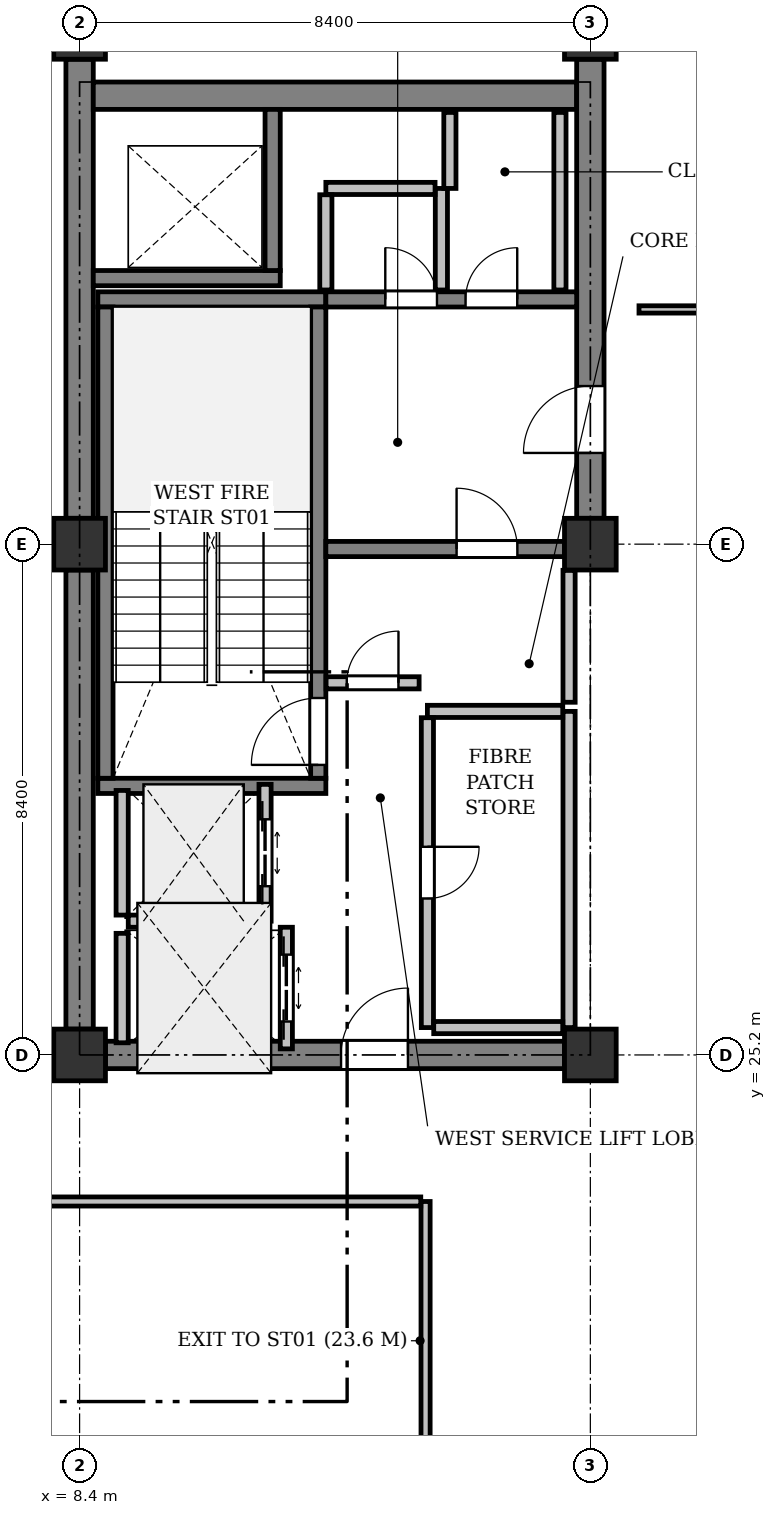
"""IFC4 building model, lengths in metres.
Left out: names, types, materials, properties, quantities, classifications, styles, units other than length and angle.
Written with IfcOpenShell. Run it as: python <this file> out.ifc"""

import sys

from ifc_helpers import new_model, si_unit, direction, frame, frame_2d, origin, origin_2d, place, context, subcontext, project, spatial, rectangle, extrude, element, fill, save


model = new_model("IFC4")
c1 = context("Model", 3, precision=1e-05, world=origin(), true_north=direction((0.0, 1.0)))
c2 = subcontext(c1, "Body", "Model", "MODEL_VIEW")
j1 = project(units=[si_unit("LENGTHUNIT", "METRE"), si_unit("PLANEANGLEUNIT", "RADIAN")], contexts=[c1])
p1 = place(None, origin())
s1 = spatial("IfcSite", under=j1, at=p1, CompositionType="ELEMENT")
p2 = place(p1, origin())
s2 = spatial("IfcBuilding", under=s1, at=p2, CompositionType="ELEMENT")
p3 = place(p2, frame((0.0, 0.0, 245.2)))
s3 = spatial("IfcBuildingStorey", under=s2, at=p3, CompositionType="ELEMENT", Elevation=245.2)
for number, where, z_axis, x_axis in (
    (1, (8.4, 25.2, 0.0), (0.0, 0.0, 1.0), (1.0, 0.0, 0.0)),
    (2, (8.4, 33.6, 0.0), (0.0, 0.0, 1.0), (1.0, 0.0, 0.0)),
    (3, (8.4, 42.0, 0.0), (0.0, 0.0, 1.0), (1.0, 0.0, 0.0)),
    (4, (16.8, 25.2, 0.0), (0.0, 0.0, 1.0), (1.0, 0.0, 0.0)),
    (5, (16.8, 33.6, 0.0), (0.0, 0.0, 1.0), (1.0, 0.0, 0.0)),
    (6, (16.8, 42.0, 0.0), (0.0, 0.0, 1.0), (1.0, 0.0, 0.0)),
):
    element("IfcColumn", number, at=place(p3, frame(where, z_axis=z_axis, x_axis=x_axis)), inside=s3, PredefinedType="COLUMN", context=c2, shape_type="SweptSolid", body=[
        extrude(rectangle(XDim=1.0, YDim=1.0, at=origin_2d()), origin(), (0.0, 0.0, 1.0), 5.0),
    ])
p4 = place(p3, frame((8.4, 25.7, 0.0), z_axis=(0.0, 0.0, 1.0), x_axis=(0.0, 1.0, 0.0)))
e7 = element("IfcWall", 7, at=p4, inside=s3, PredefinedType="SHEAR", context=c2, shape_type="SweptSolid", body=[
    extrude(rectangle(XDim=7.4, YDim=0.45, at=frame_2d((3.7, 0.0))), origin(), (0.0, 0.0, 1.0), 4.725),
])
p5 = place(p3, frame((8.4, 34.1, 0.0), z_axis=(0.0, 0.0, 1.0), x_axis=(0.0, 1.0, 0.0)))
e8 = element("IfcWall", 8, at=p5, inside=s3, PredefinedType="SHEAR", context=c2, shape_type="SweptSolid", body=[
    extrude(rectangle(XDim=7.4, YDim=0.45, at=frame_2d((3.7, 0.0))), origin(), (0.0, 0.0, 1.0), 4.725),
])
p6 = place(p3, frame((8.625, 40.975, 0.0), z_axis=(0.0, 0.0, 1.0), x_axis=(1.0, 0.0, 0.0)))
e9 = element("IfcWall", 9, at=p6, inside=s3, PredefinedType="SHEAR", context=c2, shape_type="SweptSolid", body=[
    extrude(rectangle(XDim=7.95, YDim=0.45, at=frame_2d((3.975, 0.0))), origin(), (0.0, 0.0, 1.0), 4.725),
])
p7 = place(p3, frame((16.8, 34.1, 0.0), z_axis=(0.0, 0.0, 1.0), x_axis=(0.0, 1.0, 0.0)))
e10 = element("IfcWall", 10, at=p7, inside=s3, PredefinedType="SHEAR", context=c2, shape_type="SweptSolid", body=[
    extrude(rectangle(XDim=7.4, YDim=0.45, at=frame_2d((3.7, 0.0))), origin(), (0.0, 0.0, 1.0), 4.725),
])
p8 = place(p7, frame((1.0, 0.0, 0.0)))
e11 = element("IfcOpeningElement", 11, at=p8, cuts=e10, PredefinedType="OPENING", context=c2, shape_type="SweptSolid", body=[
    extrude(rectangle(XDim=1.1, YDim=2.15, at=frame_2d((0.55, 1.075))), frame((0.0, 0.235, 0.0), z_axis=(0.0, -1.0, 0.0), x_axis=(1.0, 0.0, 0.0)), (0.0, 0.0, 1.0), 0.47),
])
p9 = place(p3, frame((8.9, 25.2, 0.0), z_axis=(0.0, 0.0, 1.0), x_axis=(1.0, 0.0, 0.0)))
e12 = element("IfcWall", 12, at=p9, inside=s3, PredefinedType="SHEAR", context=c2, shape_type="SweptSolid", body=[
    extrude(rectangle(XDim=7.4, YDim=0.45, at=frame_2d((3.7, 0.0))), origin(), (0.0, 0.0, 1.0), 4.725),
])
p10 = place(p9, frame((3.8, 0.0, 0.0)))
e13 = element("IfcOpeningElement", 13, at=p10, cuts=e12, PredefinedType="OPENING", context=c2, shape_type="SweptSolid", body=[
    extrude(rectangle(XDim=1.1, YDim=2.15, at=frame_2d((0.55, 1.075))), frame((0.0, 0.235, 0.0), z_axis=(0.0, -1.0, 0.0), x_axis=(1.0, 0.0, 0.0)), (0.0, 0.0, 1.0), 0.47),
])
for number, where, z_axis, x_axis in (
    (14, (12.45, 29.625, 0.0), (0.0, 0.0, 1.0), (-1.0, 0.0, 0.0)),
    (15, (12.45, 37.625, 0.0), (0.0, 0.0, 1.0), (-1.0, 0.0, 0.0)),
):
    element("IfcWall", number, at=place(p3, frame(where, z_axis=z_axis, x_axis=x_axis)), inside=s3, PredefinedType="SHEAR", context=c2, shape_type="SweptSolid", body=[
        extrude(rectangle(XDim=3.75, YDim=0.25, at=frame_2d((1.875, 0.0))), origin(), (0.0, 0.0, 1.0), 4.725),
    ])
p11 = place(p3, frame((12.325, 29.75, 0.0), z_axis=(0.0, 0.0, 1.0), x_axis=(0.0, 1.0, 0.0)))
e16 = element("IfcWall", 16, at=p11, inside=s3, PredefinedType="SHEAR", context=c2, shape_type="SweptSolid", body=[
    extrude(rectangle(XDim=7.75, YDim=0.25, at=frame_2d((3.875, 0.0))), origin(), (0.0, 0.0, 1.0), 4.725),
])
p12 = place(p11, frame((0.22, 0.0, 0.0)))
e17 = element("IfcOpeningElement", 17, at=p12, cuts=e16, PredefinedType="OPENING", context=c2, shape_type="SweptSolid", body=[
    extrude(rectangle(XDim=1.1, YDim=2.15, at=frame_2d((0.55, 1.075))), frame((0.0, 0.135, 0.0), z_axis=(0.0, -1.0, 0.0), x_axis=(1.0, 0.0, 0.0)), (0.0, 0.0, 1.0), 0.27),
])
p13 = place(p3, frame((8.825, 29.75, 0.0), z_axis=(0.0, 0.0, 1.0), x_axis=(0.0, 1.0, 0.0)))
e18 = element("IfcWall", 18, at=p13, inside=s3, PredefinedType="SHEAR", context=c2, shape_type="SweptSolid", body=[
    extrude(rectangle(XDim=7.75, YDim=0.25, at=frame_2d((3.875, 0.0))), origin(), (0.0, 0.0, 1.0), 4.725),
])
p14 = place(p3, frame((8.625, 37.975, 0.0), z_axis=(0.0, 0.0, 1.0), x_axis=(1.0, 0.0, 0.0)))
e19 = element("IfcWall", 19, at=p14, inside=s3, PredefinedType="SHEAR", context=c2, shape_type="SweptSolid", body=[
    extrude(rectangle(XDim=3.075, YDim=0.25, at=frame_2d((1.538, 0.0))), origin(), (0.0, 0.0, 1.0), 4.725),
])
p15 = place(p3, frame((11.575, 38.1, 0.0), z_axis=(0.0, 0.0, 1.0), x_axis=(0.0, 1.0, 0.0)))
e20 = element("IfcWall", 20, at=p15, inside=s3, PredefinedType="SHEAR", context=c2, shape_type="SweptSolid", body=[
    extrude(rectangle(XDim=2.65, YDim=0.25, at=frame_2d((1.325, 0.0))), origin(), (0.0, 0.0, 1.0), 4.725),
])
p16 = place(p3, frame((12.45, 33.52, 0.0), z_axis=(0.0, 0.0, 1.0), x_axis=(1.0, 0.0, 0.0)))
e21 = element("IfcWall", 21, at=p16, inside=s3, PredefinedType="SHEAR", context=c2, shape_type="SweptSolid", body=[
    extrude(rectangle(XDim=3.85, YDim=0.25, at=frame_2d((1.925, 0.0))), origin(), (0.0, 0.0, 1.0), 4.725),
])
p17 = place(p16, frame((0.32, 0.0, 0.0)))
e22 = element("IfcOpeningElement", 22, at=p17, cuts=e21, PredefinedType="OPENING", context=c2, shape_type="SweptSolid", body=[
    extrude(rectangle(XDim=1.0, YDim=2.15, at=frame_2d((0.5, 1.075))), frame((0.0, 0.135, 0.0), z_axis=(0.0, -1.0, 0.0), x_axis=(1.0, 0.0, 0.0)), (0.0, 0.0, 1.0), 0.27),
])
p18 = place(p3, frame((12.45, 37.625, 0.0), z_axis=(0.0, 0.0, 1.0), x_axis=(1.0, 0.0, 0.0)))
e23 = element("IfcWall", 23, at=p18, inside=s3, PredefinedType="SHEAR", context=c2, shape_type="SweptSolid", body=[
    extrude(rectangle(XDim=4.125, YDim=0.25, at=frame_2d((2.062, 0.0))), origin(), (0.0, 0.0, 1.0), 4.725),
])
p19 = place(p18, frame((1.637, 0.0, 0.0)))
e24 = element("IfcOpeningElement", 24, at=p19, cuts=e23, PredefinedType="OPENING", context=c2, shape_type="SweptSolid", body=[
    extrude(rectangle(XDim=0.85, YDim=2.15, at=frame_2d((0.425, 1.075))), frame((0.0, 0.135, 0.0), z_axis=(0.0, -1.0, 0.0), x_axis=(1.0, 0.0, 0.0)), (0.0, 0.0, 1.0), 0.27),
])
p20 = place(p3, frame((11.45, 27.4, 0.0), z_axis=(0.0, 0.0, 1.0), x_axis=(0.0, 1.0, 0.0)))
e25 = element("IfcWall", 25, at=p20, inside=s3, PredefinedType="PARTITIONING", context=c2, shape_type="SweptSolid", body=[
    extrude(rectangle(XDim=2.25, YDim=0.2, at=frame_2d((1.125, 0.0))), origin(), (0.0, 0.0, 1.0), 4.725),
])
p21 = place(p20, frame((0.575, 0.0, 0.0)))
e26 = element("IfcOpeningElement", 26, at=p21, cuts=e25, PredefinedType="OPENING", context=c2, shape_type="SweptSolid", body=[
    extrude(rectangle(XDim=1.1, YDim=2.2, at=frame_2d((0.55, 1.1))), frame((0.0, 0.11, 0.0), z_axis=(0.0, -1.0, 0.0), x_axis=(1.0, 0.0, 0.0)), (0.0, 0.0, 1.0), 0.22),
])
p22 = place(p3, frame((9.1, 27.5, 0.0), z_axis=(0.0, 0.0, 1.0), x_axis=(0.0, 1.0, 0.0)))
e27 = element("IfcWall", 27, at=p22, inside=s3, PredefinedType="PARTITIONING", context=c2, shape_type="SweptSolid", body=[
    extrude(rectangle(XDim=2.05, YDim=0.2, at=frame_2d((1.025, 0.0))), origin(), (0.0, 0.0, 1.0), 4.725),
])
p23 = place(p3, frame((9.2, 27.4, 0.0), z_axis=(0.0, 0.0, 1.0), x_axis=(1.0, 0.0, 0.0)))
e28 = element("IfcWall", 28, at=p23, inside=s3, PredefinedType="PARTITIONING", context=c2, shape_type="SweptSolid", body=[
    extrude(rectangle(XDim=2.15, YDim=0.2, at=frame_2d((1.075, 0.0))), origin(), (0.0, 0.0, 1.0), 4.725),
])
p24 = place(p3, frame((11.8, 25.3, 0.0), z_axis=(0.0, 0.0, 1.0), x_axis=(0.0, 1.0, 0.0)))
e29 = element("IfcWall", 29, at=p24, inside=s3, PredefinedType="PARTITIONING", context=c2, shape_type="SweptSolid", body=[
    extrude(rectangle(XDim=2.0, YDim=0.2, at=frame_2d((1.0, 0.0))), origin(), (0.0, 0.0, 1.0), 4.725),
])
p25 = place(p24, frame((0.45, 0.0, 0.0)))
e30 = element("IfcOpeningElement", 30, at=p25, cuts=e29, PredefinedType="OPENING", context=c2, shape_type="SweptSolid", body=[
    extrude(rectangle(XDim=1.1, YDim=2.2, at=frame_2d((0.55, 1.1))), frame((0.0, 0.11, 0.0), z_axis=(0.0, -1.0, 0.0), x_axis=(1.0, 0.0, 0.0)), (0.0, 0.0, 1.0), 0.22),
])
p26 = place(p3, frame((9.1, 25.4, 0.0), z_axis=(0.0, 0.0, 1.0), x_axis=(0.0, 1.0, 0.0)))
e31 = element("IfcWall", 31, at=p26, inside=s3, PredefinedType="PARTITIONING", context=c2, shape_type="SweptSolid", body=[
    extrude(rectangle(XDim=1.8, YDim=0.2, at=frame_2d((0.9, 0.0))), origin(), (0.0, 0.0, 1.0), 4.725),
])
p27 = place(p3, frame((16.45, 25.705, 0.0), z_axis=(0.0, 0.0, 1.0), x_axis=(0.0, 1.0, 0.0)))
e32 = element("IfcWall", 32, at=p27, inside=s3, PredefinedType="PARTITIONING", context=c2, shape_type="SweptSolid", body=[
    extrude(rectangle(XDim=7.39, YDim=0.2, at=frame_2d((3.695, 0.0))), origin(), (0.0, 0.0, 1.0), 4.725),
])
p28 = place(p3, frame((14.25, 33.39, 0.0), z_axis=(0.0, 0.0, 1.0), x_axis=(0.0, -1.0, 0.0)))
e33 = element("IfcWall", 33, at=p28, inside=s3, PredefinedType="PARTITIONING", context=c2, shape_type="SweptSolid", body=[
    extrude(rectangle(XDim=7.74, YDim=0.2, at=frame_2d((3.87, 0.0))), origin(), (0.0, 0.0, 1.0), 4.725),
])
p29 = place(p28, frame((3.445, 0.0, 0.0)))
e34 = element("IfcOpeningElement", 34, at=p29, cuts=e33, PredefinedType="OPENING", context=c2, shape_type="SweptSolid", body=[
    extrude(rectangle(XDim=0.85, YDim=2.15, at=frame_2d((0.425, 1.075))), frame((0.0, 0.11, 0.0), z_axis=(0.0, -1.0, 0.0), x_axis=(1.0, 0.0, 0.0)), (0.0, 0.0, 1.0), 0.22),
])
p30 = place(p3, frame((14.354, 25.65, 0.0), z_axis=(0.0, 0.0, 1.0), x_axis=(1.0, 0.0, 0.0)))
e35 = element("IfcWall", 35, at=p30, inside=s3, PredefinedType="PARTITIONING", context=c2, shape_type="SweptSolid", body=[
    extrude(rectangle(XDim=1.941, YDim=0.2, at=frame_2d((0.97, 0.0))), origin(), (0.0, 0.0, 1.0), 4.725),
])
for number, where, z_axis, x_axis in (
    (36, (16.3, 37.78, 0.0), (0.0, 0.0, 1.0), (0.0, 1.0, 0.0)),
    (37, (12.45, 40.7, 0.0), (0.0, 0.0, 1.0), (0.0, -1.0, 0.0)),
):
    element("IfcWall", number, at=place(p3, frame(where, z_axis=z_axis, x_axis=x_axis)), inside=s3, PredefinedType="PARTITIONING", context=c2, shape_type="SweptSolid", body=[
        extrude(rectangle(XDim=2.92, YDim=0.2, at=frame_2d((1.46, 0.0))), origin(), (0.0, 0.0, 1.0), 3.775),
    ])
p31 = place(p3, frame((17.32, 34.1, 0.0), z_axis=(0.0, 0.0, 1.0), x_axis=(0.0, -1.0, 0.0)))
e38 = element("IfcWall", 38, at=p31, inside=s3, PredefinedType="PARTITIONING", context=c2, shape_type="SweptSolid", body=[
    extrude(rectangle(XDim=0.7, YDim=0.2, at=frame_2d((0.35, 0.0))), origin(), (0.0, 0.0, 1.0), 3.825),
])
p32 = place(p3, frame((17.424, 33.4, 0.0), z_axis=(0.0, 0.0, 1.0), x_axis=(1.0, 0.0, 0.0)))
e39 = element("IfcWall", 39, at=p32, inside=s3, PredefinedType="PARTITIONING", context=c2, shape_type="SweptSolid", body=[
    extrude(rectangle(XDim=7.652, YDim=0.2, at=frame_2d((3.826, 0.0))), origin(), (0.0, 0.0, 1.0), 3.825),
])
p33 = place(p3, frame((7.814, 19.96, 0.0), z_axis=(0.0, 0.0, 1.0), x_axis=(1.0, 0.0, 0.0)))
e40 = element("IfcWall", 40, at=p33, inside=s3, PredefinedType="PARTITIONING", context=c2, shape_type="SweptSolid", body=[
    extrude(rectangle(XDim=3.526, YDim=0.2, at=frame_2d((1.763, 0.0))), origin(), (0.0, 0.0, 1.0), 3.709),
])
p34 = place(p3, frame((11.34, 20.064, 0.0), z_axis=(0.0, 0.0, 1.0), x_axis=(0.0, 1.0, 0.0)))
e41 = element("IfcWall", 41, at=p34, inside=s3, PredefinedType="PARTITIONING", context=c2, shape_type="SweptSolid", body=[
    extrude(rectangle(XDim=4.907, YDim=0.2, at=frame_2d((2.454, 0.0))), origin(), (0.0, 0.0, 1.0), 4.725),
])
p35 = place(p3, frame((8.906, 24.681, 0.0), z_axis=(0.0, 0.0, 1.0), x_axis=(-0.999999528702, -0.000970873329, 0.0)))
e42 = element("IfcWall", 42, at=p35, inside=s3, PredefinedType="PARTITIONING", context=c2, shape_type="SweptSolid", body=[
    extrude(rectangle(XDim=1.006, YDim=0.2, at=frame_2d((0.503, 0.0))), origin(), (0.0, 0.0, 1.0), 3.709),
])
p36 = place(p3, frame((14.26, 19.96, 0.0), z_axis=(0.0, 0.0, 1.0), x_axis=(1.0, 0.0, 0.0)))
e43 = element("IfcWall", 43, at=p36, inside=s3, PredefinedType="PARTITIONING", context=c2, shape_type="SweptSolid", body=[
    extrude(rectangle(XDim=3.28, YDim=0.2, at=frame_2d((1.64, 0.0))), origin(), (0.0, 0.0, 1.0), 3.709),
])
p37 = place(p3, frame((17.54, 20.064, 0.0), z_axis=(0.0, 0.0, 1.0), x_axis=(0.0, 1.0, 0.0)))
e44 = element("IfcWall", 44, at=p37, inside=s3, PredefinedType="PARTITIONING", context=c2, shape_type="SweptSolid", body=[
    extrude(rectangle(XDim=8.847, YDim=0.2, at=frame_2d((4.424, 0.0))), origin(), (0.0, 0.0, 1.0), 3.825),
])
p38 = place(p37, frame((3.216, 0.0, 0.0)))
e45 = element("IfcOpeningElement", 45, at=p38, cuts=e44, PredefinedType="OPENING", context=c2, shape_type="SweptSolid", body=[
    extrude(rectangle(XDim=1.0, YDim=2.15, at=frame_2d((0.5, 1.075))), frame((0.0, 0.11, 0.0), z_axis=(0.0, -1.0, 0.0), x_axis=(1.0, 0.0, 0.0)), (0.0, 0.0, 1.0), 0.22),
])
p39 = place(p3, frame((17.025, 28.911, 0.0), z_axis=(0.0, 0.0, 1.0), x_axis=(0.0, -1.0, 0.0)))
e46 = element("IfcWall", 46, at=p39, inside=s3, PredefinedType="PARTITIONING", context=c2, shape_type="SweptSolid", body=[
    extrude(rectangle(XDim=3.191, YDim=0.2, at=frame_2d((1.596, 0.0))), origin(), (0.0, 0.0, 1.0), 3.709),
])
p40 = place(p3, frame((17.3, 24.68, 0.0), z_axis=(0.0, 0.0, 1.0), x_axis=(-0.999999528702, 0.000970873329, 0.0)))
e47 = element("IfcWall", 47, at=p40, inside=s3, PredefinedType="PARTITIONING", context=c2, shape_type="SweptSolid", body=[
    extrude(rectangle(XDim=1.006, YDim=0.2, at=frame_2d((0.503, 0.0))), origin(), (0.0, 0.0, 1.0), 3.709),
])
p41 = place(p3, frame((14.26, 24.971, 0.0), z_axis=(0.0, 0.0, 1.0), x_axis=(0.0, -1.0, 0.0)))
e48 = element("IfcWall", 48, at=p41, inside=s3, PredefinedType="PARTITIONING", context=c2, shape_type="SweptSolid", body=[
    extrude(rectangle(XDim=4.907, YDim=0.2, at=frame_2d((2.454, 0.0))), origin(), (0.0, 0.0, 1.0), 4.725),
])
p42 = place(p8, origin())
e49 = element("IfcDoor", 49, at=p42, inside=s3, OperationType="SINGLE_SWING_RIGHT", PredefinedType="DOOR", context=c2, shape_type="SweptSolid", body=[
    extrude(rectangle(XDim=1.1, YDim=2.15, at=frame_2d((0.55, 1.075))), frame((0.0, 0.025, 0.0), z_axis=(0.0, -1.0, 0.0), x_axis=(1.0, 0.0, 0.0)), (0.0, 0.0, 1.0), 0.05),
])
fill(e11, e49)
p43 = place(p10, origin())
e50 = element("IfcDoor", 50, at=p43, inside=s3, OperationType="SINGLE_SWING_LEFT", PredefinedType="DOOR", context=c2, shape_type="SweptSolid", body=[
    extrude(rectangle(XDim=1.1, YDim=2.15, at=frame_2d((0.55, 1.075))), frame((0.0, 0.025, 0.0), z_axis=(0.0, -1.0, 0.0), x_axis=(1.0, 0.0, 0.0)), (0.0, 0.0, 1.0), 0.05),
])
fill(e13, e50)
p44 = place(p12, origin())
e51 = element("IfcDoor", 51, at=p44, inside=s3, OperationType="SINGLE_SWING_RIGHT", PredefinedType="DOOR", context=c2, shape_type="SweptSolid", body=[
    extrude(rectangle(XDim=1.1, YDim=2.15, at=frame_2d((0.55, 1.075))), frame((0.0, 0.025, 0.0), z_axis=(0.0, -1.0, 0.0), x_axis=(1.0, 0.0, 0.0)), (0.0, 0.0, 1.0), 0.05),
])
fill(e17, e51)
p45 = place(p17, origin())
e52 = element("IfcDoor", 52, at=p45, inside=s3, OperationType="SINGLE_SWING_RIGHT", PredefinedType="DOOR", context=c2, shape_type="SweptSolid", body=[
    extrude(rectangle(XDim=1.0, YDim=2.15, at=frame_2d((0.5, 1.075))), frame((0.0, 0.025, 0.0), z_axis=(0.0, -1.0, 0.0), x_axis=(1.0, 0.0, 0.0)), (0.0, 0.0, 1.0), 0.05),
])
fill(e22, e52)
p46 = place(p21, origin())
e53 = element("IfcDoor", 53, at=p46, inside=s3, OperationType="DOUBLE_DOOR_SLIDING", PredefinedType="DOOR", context=c2, shape_type="SweptSolid", body=[
    extrude(rectangle(XDim=1.1, YDim=2.2, at=frame_2d((0.55, 1.1))), frame((0.0, 0.025, 0.0), z_axis=(0.0, -1.0, 0.0), x_axis=(1.0, 0.0, 0.0)), (0.0, 0.0, 1.0), 0.05),
])
fill(e26, e53)
p47 = place(p25, origin())
e54 = element("IfcDoor", 54, at=p47, inside=s3, OperationType="DOUBLE_DOOR_SLIDING", PredefinedType="DOOR", context=c2, shape_type="SweptSolid", body=[
    extrude(rectangle(XDim=1.1, YDim=2.2, at=frame_2d((0.55, 1.1))), frame((0.0, 0.025, 0.0), z_axis=(0.0, -1.0, 0.0), x_axis=(1.0, 0.0, 0.0)), (0.0, 0.0, 1.0), 0.05),
])
fill(e30, e54)
p48 = place(p29, origin())
e55 = element("IfcDoor", 55, at=p48, inside=s3, OperationType="SINGLE_SWING_RIGHT", PredefinedType="DOOR", context=c2, shape_type="SweptSolid", body=[
    extrude(rectangle(XDim=0.85, YDim=2.15, at=frame_2d((0.425, 1.075))), frame((0.0, 0.025, 0.0), z_axis=(0.0, -1.0, 0.0), x_axis=(1.0, 0.0, 0.0)), (0.0, 0.0, 1.0), 0.05),
])
fill(e34, e55)
p49 = place(p19, origin())
e56 = element("IfcDoor", 56, at=p49, inside=s3, OperationType="SINGLE_SWING_LEFT", PredefinedType="DOOR", context=c2, shape_type="SweptSolid", body=[
    extrude(rectangle(XDim=0.85, YDim=2.15, at=frame_2d((0.425, 1.075))), frame((0.0, 0.025, 0.0), z_axis=(0.0, -1.0, 0.0), x_axis=(1.0, 0.0, 0.0)), (0.0, 0.0, 1.0), 0.05),
])
fill(e24, e56)
p50 = place(p38, origin())
e57 = element("IfcDoor", 57, at=p50, inside=s3, OperationType="SINGLE_SWING_LEFT", PredefinedType="DOOR", context=c2, shape_type="SweptSolid", body=[
    extrude(rectangle(XDim=1.0, YDim=2.15, at=frame_2d((0.5, 1.075))), frame((0.0, 0.025, 0.0), z_axis=(0.0, -1.0, 0.0), x_axis=(1.0, 0.0, 0.0)), (0.0, 0.0, 1.0), 0.05),
])
fill(e45, e57)
save(model, sys.argv[1])
